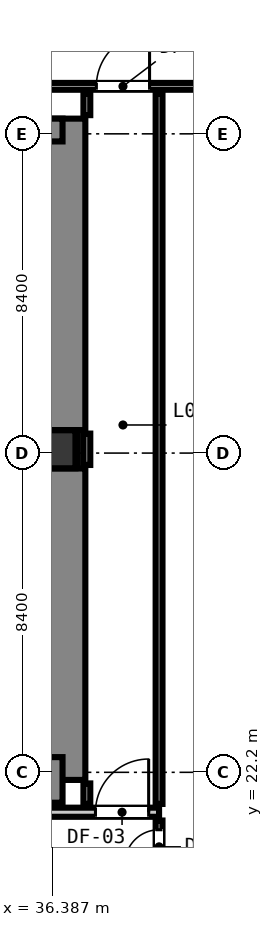
"""IFC4 building model, lengths in metres.
Left out: names, types, materials, properties, quantities, classifications, styles, units other than length and angle.
Written with IfcOpenShell. Run it as: python <this file> out.ifc"""

import sys

from ifc_helpers import new_model, si_unit, direction, frame, frame_2d, origin, origin_2d, place, context, subcontext, project, spatial, rectangle, extrude, element, fill, save


model = new_model("IFC4")
c1 = context("Model", 3, precision=1e-05, world=origin(), true_north=direction((0.0, 1.0)))
c2 = subcontext(c1, "Body", "Model", "MODEL_VIEW")
j1 = project(units=[si_unit("LENGTHUNIT", "METRE"), si_unit("PLANEANGLEUNIT", "RADIAN")], contexts=[c1])
p1 = place(None, origin())
s1 = spatial("IfcSite", under=j1, at=p1, CompositionType="ELEMENT")
p2 = place(p1, origin())
s2 = spatial("IfcBuilding", under=s1, at=p2, CompositionType="ELEMENT")
p3 = place(p2, frame((0.0, 0.0, 13.6)))
s3 = spatial("IfcBuildingStorey", under=s2, at=p3, CompositionType="ELEMENT", Elevation=13.6)
p4 = place(p3, frame((36.5, 30.7, 0.0), z_axis=(0.0, 0.0, 1.0), x_axis=(1.0, 0.0, 0.0)))
e1 = element("IfcColumn", 1, at=p4, inside=s3, PredefinedType="COLUMN", context=c2, shape_type="SweptSolid", body=[
    extrude(rectangle(XDim=1.0, YDim=1.0, at=origin_2d()), origin(), (0.0, 0.0, 1.0), 4.2),
])
p5 = place(p3, frame((36.66, 22.0, 0.0), z_axis=(0.0, 0.0, 1.0), x_axis=(0.0, 1.0, 0.0)))
e2 = element("IfcWall", 2, at=p5, inside=s3, PredefinedType="SHEAR", context=c2, shape_type="SweptSolid", body=[
    extrude(rectangle(XDim=8.195, YDim=1.2, at=frame_2d((4.098, 0.0))), origin(), (0.0, 0.0, 1.0), 4.2),
])
p6 = place(p3, frame((36.66, 31.205, 0.0), z_axis=(0.0, 0.0, 1.0), x_axis=(0.0, 1.0, 0.0)))
e3 = element("IfcWall", 3, at=p6, inside=s3, PredefinedType="SHEAR", context=c2, shape_type="SweptSolid", body=[
    extrude(rectangle(XDim=8.195, YDim=1.2, at=frame_2d((4.097, 0.0))), origin(), (0.0, 0.0, 1.0), 4.2),
])
p7 = place(p3, frame((29.705, 22.0, 0.0), z_axis=(0.0, 0.0, 1.0), x_axis=(1.0, 0.0, 0.0)))
e4 = element("IfcWall", 4, at=p7, inside=s3, PredefinedType="SHEAR", context=c2, shape_type="SweptSolid", body=[
    extrude(rectangle(XDim=6.955, YDim=1.2, at=frame_2d((3.478, 0.0))), origin(), (0.0, 0.0, 1.0), 4.2),
])
p8 = place(p3, frame((32.58, 39.1, 0.0), z_axis=(0.0, 0.0, 1.0), x_axis=(1.0, 0.0, 0.0)))
e5 = element("IfcWall", 5, at=p8, inside=s3, PredefinedType="SHEAR", context=c2, shape_type="SweptSolid", body=[
    extrude(rectangle(XDim=4.08, YDim=0.6, at=frame_2d((2.04, 0.0))), origin(), (0.0, 0.0, 1.0), 4.2),
])
p9 = place(p3, frame((10.5, 21.15, 0.0), z_axis=(0.0, 0.0, 1.0), x_axis=(1.0, 0.0, 0.0)))
e6 = element("IfcWall", 6, at=p9, inside=s3, PredefinedType="PARTITIONING", context=c2, shape_type="SweptSolid", body=[
    extrude(rectangle(XDim=28.7, YDim=0.24, at=frame_2d((14.35, 0.0))), origin(), (0.0, 0.0, 1.0), 3.78),
])
p10 = place(p9, frame((7.71, 0.0, 0.0)))
e7 = element("IfcOpeningElement", 7, at=p10, cuts=e6, PredefinedType="OPENING", context=c2, shape_type="SweptSolid", body=[
    extrude(rectangle(XDim=1.1, YDim=2.15, at=frame_2d((0.55, 1.075))), frame((0.0, 0.13, 0.0), z_axis=(0.0, -1.0, 0.0), x_axis=(1.0, 0.0, 0.0)), (0.0, 0.0, 1.0), 0.26),
])
p11 = place(p9, frame((0.324, 0.0, 0.0)))
e8 = element("IfcOpeningElement", 8, at=p11, cuts=e6, PredefinedType="OPENING", context=c2, shape_type="SweptSolid", body=[
    extrude(rectangle(XDim=1.4, YDim=2.15, at=frame_2d((0.7, 1.075))), frame((0.0, 0.13, 0.0), z_axis=(0.0, -1.0, 0.0), x_axis=(1.0, 0.0, 0.0)), (0.0, 0.0, 1.0), 0.26),
])
p12 = place(p9, frame((27.026, 0.0, 0.0)))
e9 = element("IfcOpeningElement", 9, at=p12, cuts=e6, PredefinedType="OPENING", context=c2, shape_type="SweptSolid", body=[
    extrude(rectangle(XDim=1.4, YDim=2.15, at=frame_2d((0.7, 1.075))), frame((0.0, 0.13, 0.0), z_axis=(0.0, -1.0, 0.0), x_axis=(1.0, 0.0, 0.0)), (0.0, 0.0, 1.0), 0.26),
])
p13 = place(p3, frame((10.5, 40.25, 0.0), z_axis=(0.0, 0.0, 1.0), x_axis=(1.0, 0.0, 0.0)))
e10 = element("IfcWall", 10, at=p13, inside=s3, PredefinedType="PARTITIONING", context=c2, shape_type="SweptSolid", body=[
    extrude(rectangle(XDim=37.2, YDim=0.18, at=frame_2d((18.6, 0.0))), origin(), (0.0, 0.0, 1.0), 3.78),
])
p14 = place(p13, frame((6.935, 0.0, 0.0)))
e11 = element("IfcOpeningElement", 11, at=p14, cuts=e10, PredefinedType="OPENING", context=c2, shape_type="SweptSolid", body=[
    extrude(rectangle(XDim=1.4, YDim=2.15, at=frame_2d((0.7, 1.075))), frame((0.0, 0.1, 0.0), z_axis=(0.0, -1.0, 0.0), x_axis=(1.0, 0.0, 0.0)), (0.0, 0.0, 1.0), 0.2),
])
p15 = place(p13, frame((0.324, 0.0, 0.0)))
e12 = element("IfcOpeningElement", 12, at=p15, cuts=e10, PredefinedType="OPENING", context=c2, shape_type="SweptSolid", body=[
    extrude(rectangle(XDim=1.4, YDim=2.15, at=frame_2d((0.7, 1.075))), frame((0.0, 0.1, 0.0), z_axis=(0.0, -1.0, 0.0), x_axis=(1.0, 0.0, 0.0)), (0.0, 0.0, 1.0), 0.2),
])
p16 = place(p13, frame((27.05, 0.0, 0.0)))
e13 = element("IfcOpeningElement", 13, at=p16, cuts=e10, PredefinedType="OPENING", context=c2, shape_type="SweptSolid", body=[
    extrude(rectangle(XDim=1.4, YDim=2.15, at=frame_2d((0.7, 1.075))), frame((0.0, 0.1, 0.0), z_axis=(0.0, -1.0, 0.0), x_axis=(1.0, 0.0, 0.0)), (0.0, 0.0, 1.0), 0.2),
])
p17 = place(p3, frame((37.3, 21.368, 0.0), z_axis=(0.0, 0.0, 1.0), x_axis=(0.0, 1.0, 0.0)))
e14 = element("IfcWall", 14, at=p17, inside=s3, PredefinedType="PARTITIONING", context=c2, shape_type="SweptSolid", body=[
    extrude(rectangle(XDim=0.54, YDim=0.18, at=frame_2d((0.27, 0.0))), origin(), (0.0, 0.0, 1.0), 3.78),
])
p18 = place(p3, frame((37.3, 30.287, 0.0), z_axis=(0.0, 0.0, 1.0), x_axis=(0.0, 1.0, 0.0)))
e15 = element("IfcWall", 15, at=p18, inside=s3, PredefinedType="PARTITIONING", context=c2, shape_type="SweptSolid", body=[
    extrude(rectangle(XDim=0.826, YDim=0.18, at=frame_2d((0.413, 0.0))), origin(), (0.0, 0.0, 1.0), 3.78),
])
p19 = place(p3, frame((37.3, 39.492, 0.0), z_axis=(0.0, 0.0, 1.0), x_axis=(0.0, 1.0, 0.0)))
e16 = element("IfcWall", 16, at=p19, inside=s3, PredefinedType="PARTITIONING", context=c2, shape_type="SweptSolid", body=[
    extrude(rectangle(XDim=0.57, YDim=0.18, at=frame_2d((0.285, 0.0))), origin(), (0.0, 0.0, 1.0), 3.78),
])
p20 = place(p3, frame((39.2, 19.488, 0.0), z_axis=(0.0, 0.0, 1.0), x_axis=(0.0, 1.0, 0.0)))
e17 = element("IfcWall", 17, at=p20, inside=s3, PredefinedType="PARTITIONING", context=c2, shape_type="SweptSolid", body=[
    extrude(rectangle(XDim=1.444, YDim=0.18, at=frame_2d((0.722, 0.0))), origin(), (0.0, 0.0, 1.0), 3.78),
])
p21 = place(p20, frame((0.301, 0.0, 0.0)))
e18 = element("IfcOpeningElement", 18, at=p21, cuts=e17, PredefinedType="OPENING", context=c2, shape_type="SweptSolid", body=[
    extrude(rectangle(XDim=0.9, YDim=2.1, at=frame_2d((0.45, 1.05))), frame((0.0, 0.1, 0.0), z_axis=(0.0, -1.0, 0.0), x_axis=(1.0, 0.0, 0.0)), (0.0, 0.0, 1.0), 0.2),
])
p22 = place(p3, frame((39.2, 21.368, 0.0), z_axis=(0.0, 0.0, 1.0), x_axis=(0.0, 1.0, 0.0)))
e19 = element("IfcWall", 19, at=p22, inside=s3, PredefinedType="PARTITIONING", context=c2, shape_type="SweptSolid", body=[
    extrude(rectangle(XDim=18.694, YDim=0.18, at=frame_2d((9.347, 0.0))), origin(), (0.0, 0.0, 1.0), 3.78),
])
p23 = place(p3, frame((37.032, 30.21, 0.0), z_axis=(0.0, 0.0, 1.0), x_axis=(0.0, 1.0, 0.0)))
e20 = element("IfcWall", 20, at=p23, inside=s3, PredefinedType="PARTITIONING", context=c2, shape_type="SweptSolid", body=[
    extrude(rectangle(XDim=0.98, YDim=0.06, at=frame_2d((0.49, 0.0))), origin(), (0.0, 0.0, 1.0), 1.45),
])
p24 = place(p12, origin())
e21 = element("IfcDoor", 21, at=p24, inside=s3, OperationType="SINGLE_SWING_RIGHT", PredefinedType="DOOR", context=c2, shape_type="SweptSolid", body=[
    extrude(rectangle(XDim=1.4, YDim=2.15, at=frame_2d((0.7, 1.075))), frame((0.0, 0.025, 0.0), z_axis=(0.0, -1.0, 0.0), x_axis=(1.0, 0.0, 0.0)), (0.0, 0.0, 1.0), 0.05),
])
fill(e9, e21)
p25 = place(p16, origin())
e22 = element("IfcDoor", 22, at=p25, inside=s3, OperationType="SINGLE_SWING_RIGHT", PredefinedType="DOOR", context=c2, shape_type="SweptSolid", body=[
    extrude(rectangle(XDim=1.4, YDim=2.15, at=frame_2d((0.7, 1.075))), frame((0.0, 0.025, 0.0), z_axis=(0.0, -1.0, 0.0), x_axis=(1.0, 0.0, 0.0)), (0.0, 0.0, 1.0), 0.05),
])
fill(e13, e22)
p26 = place(p21, origin())
e23 = element("IfcDoor", 23, at=p26, inside=s3, OperationType="SINGLE_SWING_LEFT", PredefinedType="DOOR", context=c2, shape_type="SweptSolid", body=[
    extrude(rectangle(XDim=0.9, YDim=2.1, at=frame_2d((0.45, 1.05))), frame((0.0, 0.025, 0.0), z_axis=(0.0, -1.0, 0.0), x_axis=(1.0, 0.0, 0.0)), (0.0, 0.0, 1.0), 0.05),
])
fill(e18, e23)
save(model, sys.argv[1])
